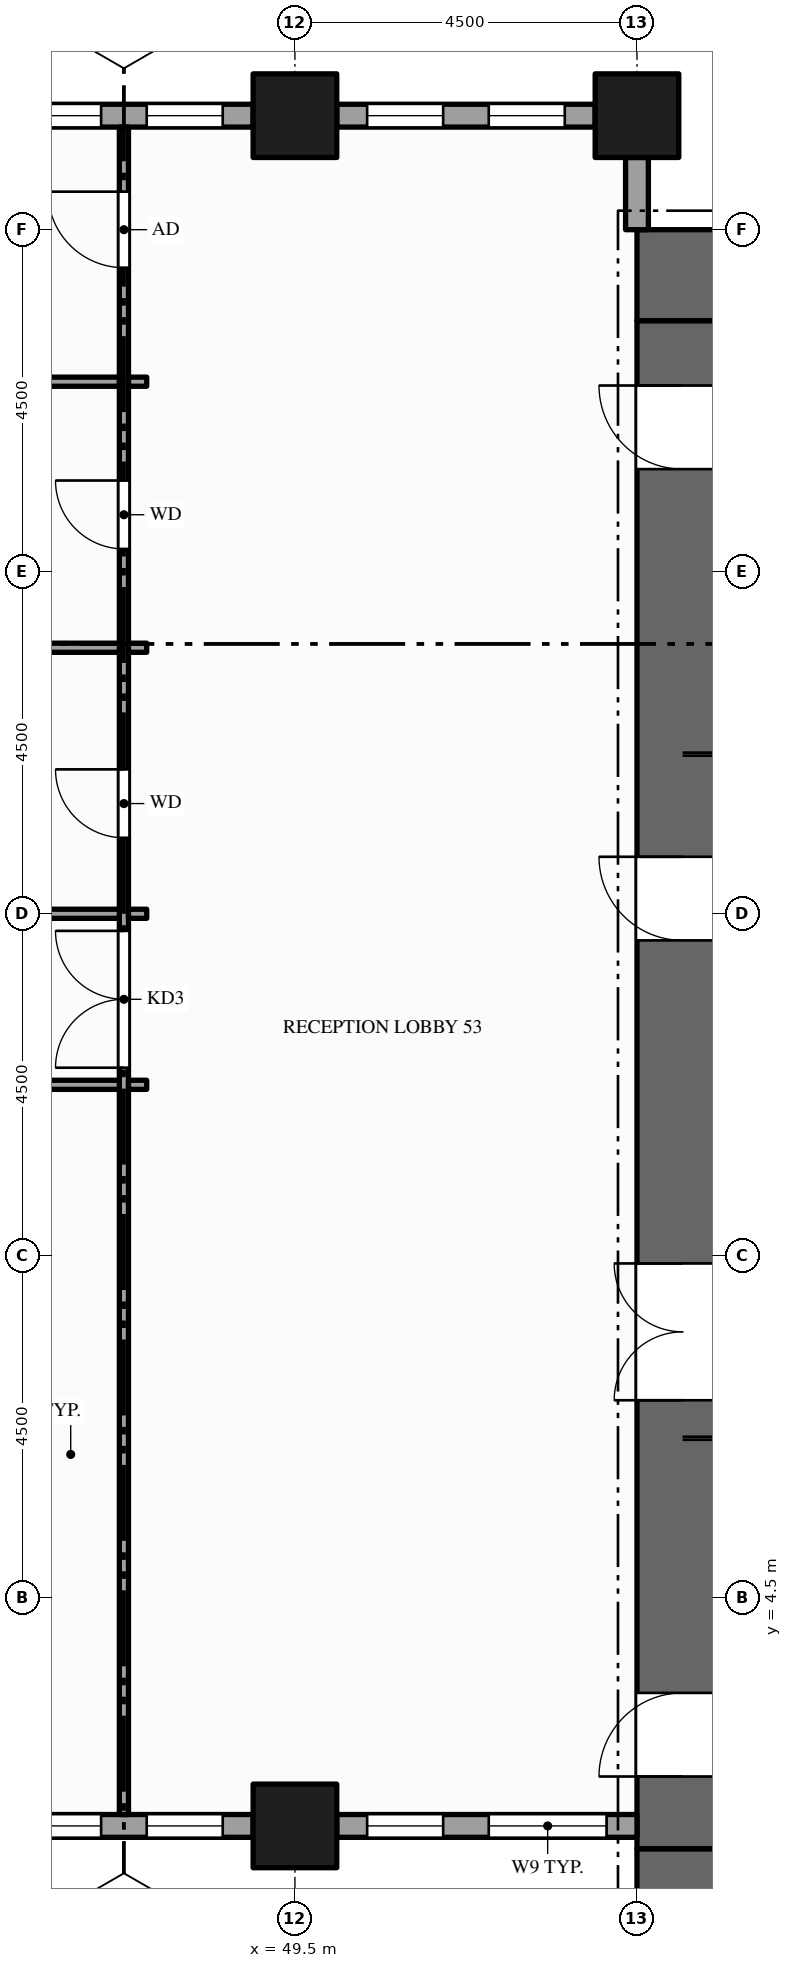
"""IFC4 building model, lengths in metres.
Left out: names, types, materials, properties, quantities, classifications, styles, units other than length and angle.
Written with IfcOpenShell. Run it as: python <this file> out.ifc"""

import sys

from ifc_helpers import new_model, si_unit, direction, frame, frame_2d, origin, origin_2d, place, context, subcontext, project, spatial, rectangle, hollow_rectangle, extrude, element, fill, save


model = new_model("IFC4")
c1 = context("Model", 3, precision=1e-05, world=origin(), true_north=direction((0.0, 1.0)))
c2 = subcontext(c1, "Body", "Model", "MODEL_VIEW")
j1 = project(units=[si_unit("LENGTHUNIT", "METRE"), si_unit("PLANEANGLEUNIT", "RADIAN")], contexts=[c1])
p1 = place(None, origin())
s1 = spatial("IfcSite", under=j1, at=p1, CompositionType="ELEMENT")
p2 = place(p1, origin())
s2 = spatial("IfcBuilding", under=s1, at=p2, CompositionType="ELEMENT")
p3 = place(p2, frame((0.0, 0.0, 45.0)))
s3 = spatial("IfcBuildingStorey", under=s2, at=p3, CompositionType="ELEMENT", Elevation=45.0)
for number, where, z_axis, x_axis in (
    (1, (67.5, 0.6, -0.15), (0.0, 0.0, 1.0), (-1.0, 0.0, 0.0)),
    (2, (54.0, 21.9, -0.15), (0.0, 0.0, 1.0), (1.0, 0.0, 0.0)),
):
    element("IfcWall", number, at=place(p3, frame(where, z_axis=z_axis, x_axis=x_axis)), inside=s3, PredefinedType="SHEAR", context=c2, shape_type="SweptSolid", body=[
        extrude(rectangle(XDim=13.5, YDim=1.2, at=frame_2d((6.75, 0.0))), origin(), (0.0, 0.0, 1.0), 4.0),
    ])
p4 = place(p3, frame((54.6, 1.2, -0.15), z_axis=(0.0, 0.0, 1.0), x_axis=(0.0, 1.0, 0.0)))
e3 = element("IfcWall", 3, at=p4, inside=s3, PredefinedType="SHEAR", context=c2, shape_type="SweptSolid", body=[
    extrude(rectangle(XDim=20.1, YDim=1.2, at=frame_2d((10.05, 0.0))), origin(), (0.0, 0.0, 1.0), 4.0),
])
p5 = place(p4, frame((5.9, 0.0, 0.15)))
e4 = element("IfcOpeningElement", 4, at=p5, cuts=e3, PredefinedType="OPENING", context=c2, shape_type="SweptSolid", body=[
    extrude(rectangle(XDim=1.8, YDim=2.1, at=frame_2d((0.9, 1.05))), frame((0.0, 0.61, 0.0), z_axis=(0.0, -1.0, 0.0), x_axis=(1.0, 0.0, 0.0)), (0.0, 0.0, 1.0), 1.22),
])
p6 = place(p4, frame((11.95, 0.0, 0.15)))
e5 = element("IfcOpeningElement", 5, at=p6, cuts=e3, PredefinedType="OPENING", context=c2, shape_type="SweptSolid", body=[
    extrude(rectangle(XDim=1.1, YDim=2.1, at=frame_2d((0.55, 1.05))), frame((0.0, 0.61, 0.0), z_axis=(0.0, -1.0, 0.0), x_axis=(1.0, 0.0, 0.0)), (0.0, 0.0, 1.0), 1.22),
])
p7 = place(p4, frame((0.95, 0.0, 0.15)))
e6 = element("IfcOpeningElement", 6, at=p7, cuts=e3, PredefinedType="OPENING", context=c2, shape_type="SweptSolid", body=[
    extrude(rectangle(XDim=1.1, YDim=2.1, at=frame_2d((0.55, 1.05))), frame((0.0, 0.61, 0.0), z_axis=(0.0, -1.0, 0.0), x_axis=(1.0, 0.0, 0.0)), (0.0, 0.0, 1.0), 1.22),
])
p8 = place(p4, frame((18.15, 0.0, 0.15)))
e7 = element("IfcOpeningElement", 7, at=p8, cuts=e3, PredefinedType="OPENING", context=c2, shape_type="SweptSolid", body=[
    extrude(rectangle(XDim=1.1, YDim=2.1, at=frame_2d((0.55, 1.05))), frame((0.0, 0.61, 0.0), z_axis=(0.0, -1.0, 0.0), x_axis=(1.0, 0.0, 0.0)), (0.0, 0.0, 1.0), 1.22),
])
for number, where, z_axis, x_axis in (
    (8, (49.5, 1.5, -0.15), (0.0, 0.0, 1.0), (1.0, 0.0, 0.0)),
    (9, (49.5, 24.0, -0.15), (0.0, 0.0, 1.0), (1.0, 0.0, 0.0)),
    (10, (54.0, 24.0, -0.15), (0.0, 0.0, 1.0), (1.0, 0.0, 0.0)),
):
    element("IfcColumn", number, at=place(p3, frame(where, z_axis=z_axis, x_axis=x_axis)), inside=s3, PredefinedType="COLUMN", context=c2, shape_type="SweptSolid", body=[
        extrude(hollow_rectangle(XDim=1.1, YDim=1.1, WallThickness=0.06, at=origin_2d()), origin(), (0.0, 0.0, 1.0), 4.0),
    ])
p9 = place(p3, frame((45.55, 1.5, 0.0), z_axis=(0.0, 0.0, 1.0), x_axis=(1.0, 0.0, 0.0)))
e11 = element("IfcWall", 11, at=p9, inside=s3, PredefinedType="STANDARD", context=c2, shape_type="SweptSolid", body=[
    extrude(rectangle(XDim=3.4, YDim=0.3, at=frame_2d((1.7, 0.0))), origin(), (0.0, 0.0, 1.0), 3.144),
])
p10 = place(p9, frame((0.4, 0.0, 0.9)))
e12 = element("IfcOpeningElement", 12, at=p10, cuts=e11, PredefinedType="OPENING", context=c2, shape_type="SweptSolid", body=[
    extrude(rectangle(XDim=1.0, YDim=2.0, at=frame_2d((0.5, 1.0))), frame((0.0, 0.16, 0.0), z_axis=(0.0, -1.0, 0.0), x_axis=(1.0, 0.0, 0.0)), (0.0, 0.0, 1.0), 0.32),
])
p11 = place(p9, frame((2.0, 0.0, 0.9)))
e13 = element("IfcOpeningElement", 13, at=p11, cuts=e11, PredefinedType="OPENING", context=c2, shape_type="SweptSolid", body=[
    extrude(rectangle(XDim=1.0, YDim=2.0, at=frame_2d((0.5, 1.0))), frame((0.0, 0.16, 0.0), z_axis=(0.0, -1.0, 0.0), x_axis=(1.0, 0.0, 0.0)), (0.0, 0.0, 1.0), 0.32),
])
p12 = place(p3, frame((50.05, 1.5, 0.0), z_axis=(0.0, 0.0, 1.0), x_axis=(1.0, 0.0, 0.0)))
e14 = element("IfcWall", 14, at=p12, inside=s3, PredefinedType="STANDARD", context=c2, shape_type="SweptSolid", body=[
    extrude(rectangle(XDim=3.95, YDim=0.3, at=frame_2d((1.975, 0.0))), origin(), (0.0, 0.0, 1.0), 3.144),
])
p13 = place(p12, frame((0.4, 0.0, 0.9)))
e15 = element("IfcOpeningElement", 15, at=p13, cuts=e14, PredefinedType="OPENING", context=c2, shape_type="SweptSolid", body=[
    extrude(rectangle(XDim=1.0, YDim=2.0, at=frame_2d((0.5, 1.0))), frame((0.0, 0.16, 0.0), z_axis=(0.0, -1.0, 0.0), x_axis=(1.0, 0.0, 0.0)), (0.0, 0.0, 1.0), 0.32),
])
p14 = place(p12, frame((2.0, 0.0, 0.9)))
e16 = element("IfcOpeningElement", 16, at=p14, cuts=e14, PredefinedType="OPENING", context=c2, shape_type="SweptSolid", body=[
    extrude(rectangle(XDim=1.55, YDim=2.0, at=frame_2d((0.775, 1.0))), frame((0.0, 0.16, 0.0), z_axis=(0.0, -1.0, 0.0), x_axis=(1.0, 0.0, 0.0)), (0.0, 0.0, 1.0), 0.32),
])
p15 = place(p3, frame((54.0, 22.5, 0.0), z_axis=(0.0, 0.0, 1.0), x_axis=(0.0, 1.0, 0.0)))
e17 = element("IfcWall", 17, at=p15, inside=s3, PredefinedType="STANDARD", context=c2, shape_type="SweptSolid", body=[
    extrude(rectangle(XDim=0.95, YDim=0.3, at=frame_2d((0.475, 0.0))), origin(), (0.0, 0.0, 1.0), 3.144),
])
p16 = place(p3, frame((53.45, 24.0, 0.0), z_axis=(0.0, 0.0, 1.0), x_axis=(-1.0, 0.0, 0.0)))
e18 = element("IfcWall", 18, at=p16, inside=s3, PredefinedType="STANDARD", context=c2, shape_type="SweptSolid", body=[
    extrude(rectangle(XDim=3.4, YDim=0.3, at=frame_2d((1.7, 0.0))), origin(), (0.0, 0.0, 1.0), 3.144),
])
p17 = place(p16, frame((0.4, 0.0, 0.9)))
e19 = element("IfcOpeningElement", 19, at=p17, cuts=e18, PredefinedType="OPENING", context=c2, shape_type="SweptSolid", body=[
    extrude(rectangle(XDim=1.0, YDim=2.0, at=frame_2d((0.5, 1.0))), frame((0.0, 0.16, 0.0), z_axis=(0.0, -1.0, 0.0), x_axis=(1.0, 0.0, 0.0)), (0.0, 0.0, 1.0), 0.32),
])
p18 = place(p16, frame((2.0, 0.0, 0.9)))
e20 = element("IfcOpeningElement", 20, at=p18, cuts=e18, PredefinedType="OPENING", context=c2, shape_type="SweptSolid", body=[
    extrude(rectangle(XDim=1.0, YDim=2.0, at=frame_2d((0.5, 1.0))), frame((0.0, 0.16, 0.0), z_axis=(0.0, -1.0, 0.0), x_axis=(1.0, 0.0, 0.0)), (0.0, 0.0, 1.0), 0.32),
])
p19 = place(p3, frame((48.95, 24.0, 0.0), z_axis=(0.0, 0.0, 1.0), x_axis=(-1.0, 0.0, 0.0)))
e21 = element("IfcWall", 21, at=p19, inside=s3, PredefinedType="STANDARD", context=c2, shape_type="SweptSolid", body=[
    extrude(rectangle(XDim=3.4, YDim=0.3, at=frame_2d((1.7, 0.0))), origin(), (0.0, 0.0, 1.0), 3.144),
])
p20 = place(p19, frame((0.4, 0.0, 0.9)))
e22 = element("IfcOpeningElement", 22, at=p20, cuts=e21, PredefinedType="OPENING", context=c2, shape_type="SweptSolid", body=[
    extrude(rectangle(XDim=1.0, YDim=2.0, at=frame_2d((0.5, 1.0))), frame((0.0, 0.16, 0.0), z_axis=(0.0, -1.0, 0.0), x_axis=(1.0, 0.0, 0.0)), (0.0, 0.0, 1.0), 0.32),
])
p21 = place(p19, frame((2.0, 0.0, 0.9)))
e23 = element("IfcOpeningElement", 23, at=p21, cuts=e21, PredefinedType="OPENING", context=c2, shape_type="SweptSolid", body=[
    extrude(rectangle(XDim=1.0, YDim=2.0, at=frame_2d((0.5, 1.0))), frame((0.0, 0.16, 0.0), z_axis=(0.0, -1.0, 0.0), x_axis=(1.0, 0.0, 0.0)), (0.0, 0.0, 1.0), 0.32),
])
p22 = place(p3, frame((47.25, 1.65, 0.0), z_axis=(0.0, 0.0, 1.0), x_axis=(0.0, 1.0, 0.0)))
e24 = element("IfcWall", 24, at=p22, inside=s3, PredefinedType="PARTITIONING", context=c2, shape_type="SweptSolid", body=[
    extrude(rectangle(XDim=22.2, YDim=0.12, at=frame_2d((11.1, 0.0))), origin(), (0.0, 0.0, 1.0), 2.938),
])
p23 = place(p22, frame((9.825, 0.0, 0.0)))
e25 = element("IfcOpeningElement", 25, at=p23, cuts=e24, PredefinedType="OPENING", context=c2, shape_type="SweptSolid", body=[
    extrude(rectangle(XDim=1.8, YDim=2.1, at=frame_2d((0.9, 1.05))), frame((0.0, 0.07, 0.0), z_axis=(0.0, -1.0, 0.0), x_axis=(1.0, 0.0, 0.0)), (0.0, 0.0, 1.0), 0.14),
])
p24 = place(p22, frame((12.85, 0.0, 0.0)))
e26 = element("IfcOpeningElement", 26, at=p24, cuts=e24, PredefinedType="OPENING", context=c2, shape_type="SweptSolid", body=[
    extrude(rectangle(XDim=0.9, YDim=2.1, at=frame_2d((0.45, 1.05))), frame((0.0, 0.07, 0.0), z_axis=(0.0, -1.0, 0.0), x_axis=(1.0, 0.0, 0.0)), (0.0, 0.0, 1.0), 0.14),
])
p25 = place(p22, frame((16.65, 0.0, 0.0)))
e27 = element("IfcOpeningElement", 27, at=p25, cuts=e24, PredefinedType="OPENING", context=c2, shape_type="SweptSolid", body=[
    extrude(rectangle(XDim=0.9, YDim=2.1, at=frame_2d((0.45, 1.05))), frame((0.0, 0.07, 0.0), z_axis=(0.0, -1.0, 0.0), x_axis=(1.0, 0.0, 0.0)), (0.0, 0.0, 1.0), 0.14),
])
p26 = place(p22, frame((20.35, 0.0, 0.0)))
e28 = element("IfcOpeningElement", 28, at=p26, cuts=e24, PredefinedType="OPENING", context=c2, shape_type="SweptSolid", body=[
    extrude(rectangle(XDim=1.0, YDim=2.1, at=frame_2d((0.5, 1.05))), frame((0.0, 0.07, 0.0), z_axis=(0.0, -1.0, 0.0), x_axis=(1.0, 0.0, 0.0)), (0.0, 0.0, 1.0), 0.14),
])
p27 = place(p3, frame((42.81, 11.25, 0.0), z_axis=(0.0, 0.0, 1.0), x_axis=(1.0, 0.0, 0.0)))
e29 = element("IfcWall", 29, at=p27, inside=s3, PredefinedType="PARTITIONING", context=c2, shape_type="SweptSolid", body=[
    extrude(rectangle(XDim=4.38, YDim=0.12, at=frame_2d((2.19, 0.0))), origin(), (0.0, 0.0, 1.0), 2.938),
])
p28 = place(p27, frame((1.59, 0.0, 0.0)))
e30 = element("IfcOpeningElement", 30, at=p28, cuts=e29, PredefinedType="OPENING", context=c2, shape_type="SweptSolid", body=[
    extrude(rectangle(XDim=1.2, YDim=2.1, at=frame_2d((0.6, 1.05))), frame((0.0, 0.07, 0.0), z_axis=(0.0, -1.0, 0.0), x_axis=(1.0, 0.0, 0.0)), (0.0, 0.0, 1.0), 0.14),
])
p29 = place(p3, frame((47.31, 11.25, 0.0), z_axis=(0.0, 0.0, 1.0), x_axis=(1.0, 0.0, 0.0)))
e31 = element("IfcWall", 31, at=p29, inside=s3, PredefinedType="PARTITIONING", context=c2, shape_type="SweptSolid", body=[
    extrude(rectangle(XDim=0.24, YDim=0.12, at=frame_2d((0.12, 0.0))), origin(), (0.0, 0.0, 1.0), 2.938),
])
p30 = place(p3, frame((42.81, 13.5, 0.0), z_axis=(0.0, 0.0, 1.0), x_axis=(1.0, 0.0, 0.0)))
e32 = element("IfcWall", 32, at=p30, inside=s3, PredefinedType="PARTITIONING", context=c2, shape_type="SweptSolid", body=[
    extrude(rectangle(XDim=4.38, YDim=0.12, at=frame_2d((2.19, 0.0))), origin(), (0.0, 0.0, 1.0), 2.938),
])
p31 = place(p3, frame((47.31, 13.5, 0.0), z_axis=(0.0, 0.0, 1.0), x_axis=(1.0, 0.0, 0.0)))
e33 = element("IfcWall", 33, at=p31, inside=s3, PredefinedType="PARTITIONING", context=c2, shape_type="SweptSolid", body=[
    extrude(rectangle(XDim=0.24, YDim=0.12, at=frame_2d((0.12, 0.0))), origin(), (0.0, 0.0, 1.0), 2.938),
])
p32 = place(p3, frame((42.81, 17.0, 0.0), z_axis=(0.0, 0.0, 1.0), x_axis=(1.0, 0.0, 0.0)))
e34 = element("IfcWall", 34, at=p32, inside=s3, PredefinedType="PARTITIONING", context=c2, shape_type="SweptSolid", body=[
    extrude(rectangle(XDim=4.38, YDim=0.12, at=frame_2d((2.19, 0.0))), origin(), (0.0, 0.0, 1.0), 2.938),
])
p33 = place(p3, frame((47.31, 17.0, 0.0), z_axis=(0.0, 0.0, 1.0), x_axis=(1.0, 0.0, 0.0)))
e35 = element("IfcWall", 35, at=p33, inside=s3, PredefinedType="PARTITIONING", context=c2, shape_type="SweptSolid", body=[
    extrude(rectangle(XDim=0.24, YDim=0.12, at=frame_2d((0.12, 0.0))), origin(), (0.0, 0.0, 1.0), 2.938),
])
p34 = place(p3, frame((42.81, 20.5, 0.0), z_axis=(0.0, 0.0, 1.0), x_axis=(1.0, 0.0, 0.0)))
e36 = element("IfcWall", 36, at=p34, inside=s3, PredefinedType="PARTITIONING", context=c2, shape_type="SweptSolid", body=[
    extrude(rectangle(XDim=4.38, YDim=0.12, at=frame_2d((2.19, 0.0))), origin(), (0.0, 0.0, 1.0), 2.938),
])
p35 = place(p3, frame((47.31, 20.5, 0.0), z_axis=(0.0, 0.0, 1.0), x_axis=(1.0, 0.0, 0.0)))
e37 = element("IfcWall", 37, at=p35, inside=s3, PredefinedType="PARTITIONING", context=c2, shape_type="SweptSolid", body=[
    extrude(rectangle(XDim=0.24, YDim=0.12, at=frame_2d((0.12, 0.0))), origin(), (0.0, 0.0, 1.0), 2.938),
])
p36 = place(p10, origin())
e38 = element("IfcWindow", 38, at=p36, inside=s3, PartitioningType="SINGLE_PANEL", PredefinedType="WINDOW", context=c2, shape_type="SweptSolid", body=[
    extrude(rectangle(XDim=1.0, YDim=2.0, at=frame_2d((0.5, 1.0))), frame((0.0, 0.03, 0.0), z_axis=(0.0, -1.0, 0.0), x_axis=(1.0, 0.0, 0.0)), (0.0, 0.0, 1.0), 0.06),
])
fill(e12, e38)
p37 = place(p11, origin())
e39 = element("IfcWindow", 39, at=p37, inside=s3, PartitioningType="SINGLE_PANEL", PredefinedType="WINDOW", context=c2, shape_type="SweptSolid", body=[
    extrude(rectangle(XDim=1.0, YDim=2.0, at=frame_2d((0.5, 1.0))), frame((0.0, 0.03, 0.0), z_axis=(0.0, -1.0, 0.0), x_axis=(1.0, 0.0, 0.0)), (0.0, 0.0, 1.0), 0.06),
])
fill(e13, e39)
p38 = place(p13, origin())
e40 = element("IfcWindow", 40, at=p38, inside=s3, PartitioningType="SINGLE_PANEL", PredefinedType="WINDOW", context=c2, shape_type="SweptSolid", body=[
    extrude(rectangle(XDim=1.0, YDim=2.0, at=frame_2d((0.5, 1.0))), frame((0.0, 0.03, 0.0), z_axis=(0.0, -1.0, 0.0), x_axis=(1.0, 0.0, 0.0)), (0.0, 0.0, 1.0), 0.06),
])
fill(e15, e40)
p39 = place(p14, origin())
e41 = element("IfcWindow", 41, at=p39, inside=s3, PartitioningType="SINGLE_PANEL", PredefinedType="WINDOW", context=c2, shape_type="SweptSolid", body=[
    extrude(rectangle(XDim=1.55, YDim=2.0, at=frame_2d((0.775, 1.0))), frame((0.0, 0.03, 0.0), z_axis=(0.0, -1.0, 0.0), x_axis=(1.0, 0.0, 0.0)), (0.0, 0.0, 1.0), 0.06),
])
fill(e16, e41)
p40 = place(p17, origin())
e42 = element("IfcWindow", 42, at=p40, inside=s3, PartitioningType="SINGLE_PANEL", PredefinedType="WINDOW", context=c2, shape_type="SweptSolid", body=[
    extrude(rectangle(XDim=1.0, YDim=2.0, at=frame_2d((0.5, 1.0))), frame((0.0, 0.03, 0.0), z_axis=(0.0, -1.0, 0.0), x_axis=(1.0, 0.0, 0.0)), (0.0, 0.0, 1.0), 0.06),
])
fill(e19, e42)
p41 = place(p18, origin())
e43 = element("IfcWindow", 43, at=p41, inside=s3, PartitioningType="SINGLE_PANEL", PredefinedType="WINDOW", context=c2, shape_type="SweptSolid", body=[
    extrude(rectangle(XDim=1.0, YDim=2.0, at=frame_2d((0.5, 1.0))), frame((0.0, 0.03, 0.0), z_axis=(0.0, -1.0, 0.0), x_axis=(1.0, 0.0, 0.0)), (0.0, 0.0, 1.0), 0.06),
])
fill(e20, e43)
p42 = place(p20, origin())
e44 = element("IfcWindow", 44, at=p42, inside=s3, PartitioningType="SINGLE_PANEL", PredefinedType="WINDOW", context=c2, shape_type="SweptSolid", body=[
    extrude(rectangle(XDim=1.0, YDim=2.0, at=frame_2d((0.5, 1.0))), frame((0.0, 0.03, 0.0), z_axis=(0.0, -1.0, 0.0), x_axis=(1.0, 0.0, 0.0)), (0.0, 0.0, 1.0), 0.06),
])
fill(e22, e44)
p43 = place(p21, origin())
e45 = element("IfcWindow", 45, at=p43, inside=s3, PartitioningType="SINGLE_PANEL", PredefinedType="WINDOW", context=c2, shape_type="SweptSolid", body=[
    extrude(rectangle(XDim=1.0, YDim=2.0, at=frame_2d((0.5, 1.0))), frame((0.0, 0.03, 0.0), z_axis=(0.0, -1.0, 0.0), x_axis=(1.0, 0.0, 0.0)), (0.0, 0.0, 1.0), 0.06),
])
fill(e23, e45)
p44 = place(p5, origin())
e46 = element("IfcDoor", 46, at=p44, inside=s3, OperationType="DOUBLE_DOOR_SINGLE_SWING", PredefinedType="DOOR", context=c2, shape_type="SweptSolid", body=[
    extrude(rectangle(XDim=1.8, YDim=2.1, at=frame_2d((0.9, 1.05))), frame((0.0, 0.025, 0.0), z_axis=(0.0, -1.0, 0.0), x_axis=(1.0, 0.0, 0.0)), (0.0, 0.0, 1.0), 0.05),
])
fill(e4, e46)
p45 = place(p6, origin())
e47 = element("IfcDoor", 47, at=p45, inside=s3, OperationType="SINGLE_SWING_RIGHT", PredefinedType="DOOR", context=c2, shape_type="SweptSolid", body=[
    extrude(rectangle(XDim=1.1, YDim=2.1, at=frame_2d((0.55, 1.05))), frame((0.0, 0.025, 0.0), z_axis=(0.0, -1.0, 0.0), x_axis=(1.0, 0.0, 0.0)), (0.0, 0.0, 1.0), 0.05),
])
fill(e5, e47)
p46 = place(p7, origin())
e48 = element("IfcDoor", 48, at=p46, inside=s3, OperationType="SINGLE_SWING_LEFT", PredefinedType="DOOR", context=c2, shape_type="SweptSolid", body=[
    extrude(rectangle(XDim=1.1, YDim=2.1, at=frame_2d((0.55, 1.05))), frame((0.0, 0.025, 0.0), z_axis=(0.0, -1.0, 0.0), x_axis=(1.0, 0.0, 0.0)), (0.0, 0.0, 1.0), 0.05),
])
fill(e6, e48)
p47 = place(p8, origin())
e49 = element("IfcDoor", 49, at=p47, inside=s3, OperationType="SINGLE_SWING_RIGHT", PredefinedType="DOOR", context=c2, shape_type="SweptSolid", body=[
    extrude(rectangle(XDim=1.1, YDim=2.1, at=frame_2d((0.55, 1.05))), frame((0.0, 0.025, 0.0), z_axis=(0.0, -1.0, 0.0), x_axis=(1.0, 0.0, 0.0)), (0.0, 0.0, 1.0), 0.05),
])
fill(e7, e49)
p48 = place(p23, origin())
e50 = element("IfcDoor", 50, at=p48, inside=s3, OperationType="DOUBLE_DOOR_SINGLE_SWING", PredefinedType="DOOR", context=c2, shape_type="SweptSolid", body=[
    extrude(rectangle(XDim=1.8, YDim=2.1, at=frame_2d((0.9, 1.05))), frame((0.0, 0.025, 0.0), z_axis=(0.0, -1.0, 0.0), x_axis=(1.0, 0.0, 0.0)), (0.0, 0.0, 1.0), 0.05),
])
fill(e25, e50)
p49 = place(p24, origin())
e51 = element("IfcDoor", 51, at=p49, inside=s3, OperationType="SINGLE_SWING_RIGHT", PredefinedType="DOOR", context=c2, shape_type="SweptSolid", body=[
    extrude(rectangle(XDim=0.9, YDim=2.1, at=frame_2d((0.45, 1.05))), frame((0.0, 0.025, 0.0), z_axis=(0.0, -1.0, 0.0), x_axis=(1.0, 0.0, 0.0)), (0.0, 0.0, 1.0), 0.05),
])
fill(e26, e51)
p50 = place(p25, origin())
e52 = element("IfcDoor", 52, at=p50, inside=s3, OperationType="SINGLE_SWING_RIGHT", PredefinedType="DOOR", context=c2, shape_type="SweptSolid", body=[
    extrude(rectangle(XDim=0.9, YDim=2.1, at=frame_2d((0.45, 1.05))), frame((0.0, 0.025, 0.0), z_axis=(0.0, -1.0, 0.0), x_axis=(1.0, 0.0, 0.0)), (0.0, 0.0, 1.0), 0.05),
])
fill(e27, e52)
p51 = place(p26, origin())
e53 = element("IfcDoor", 53, at=p51, inside=s3, OperationType="SINGLE_SWING_RIGHT", PredefinedType="DOOR", context=c2, shape_type="SweptSolid", body=[
    extrude(rectangle(XDim=1.0, YDim=2.1, at=frame_2d((0.5, 1.05))), frame((0.0, 0.025, 0.0), z_axis=(0.0, -1.0, 0.0), x_axis=(1.0, 0.0, 0.0)), (0.0, 0.0, 1.0), 0.05),
])
fill(e28, e53)
save(model, sys.argv[1])
